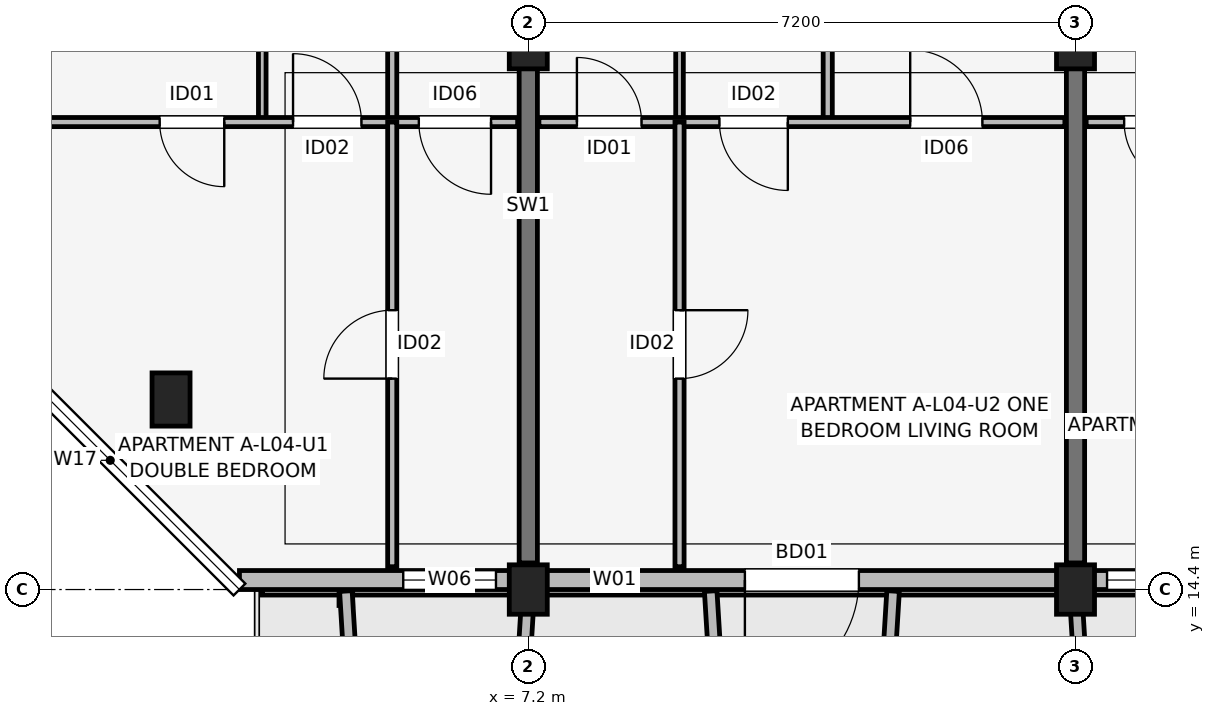
"""IFC4 building model, lengths in metres.
Left out: names, types, materials, properties, quantities, classifications, styles, units other than length and angle.
Written with IfcOpenShell. Run it as: python <this file> out.ifc"""

import sys

from ifc_helpers import new_model, si_unit, direction, frame, frame_2d, origin, origin_2d, place, context, subcontext, project, spatial, rectangle, extrude, element, fill, save


model = new_model("IFC4")
c1 = context("Model", 3, precision=1e-05, world=origin(), true_north=direction((0.0, 1.0)))
c2 = subcontext(c1, "Body", "Model", "MODEL_VIEW")
j1 = project(units=[si_unit("LENGTHUNIT", "METRE"), si_unit("PLANEANGLEUNIT", "RADIAN")], contexts=[c1])
p1 = place(None, origin())
s1 = spatial("IfcSite", under=j1, at=p1, CompositionType="ELEMENT")
p2 = place(p1, origin())
s2 = spatial("IfcBuilding", under=s1, at=p2, CompositionType="ELEMENT")
p3 = place(p2, frame((0.0, 0.0, 15.0)))
s3 = spatial("IfcBuildingStorey", under=s2, at=p3, CompositionType="ELEMENT", Elevation=15.0)
p4 = place(p3, frame((2.5, 16.9, 0.0), z_axis=(0.0, 0.0, 1.0), x_axis=(1.0, 0.0, 0.0)))
e1 = element("IfcColumn", 1, at=p4, inside=s3, PredefinedType="COLUMN", context=c2, shape_type="SweptSolid", body=[
    extrude(rectangle(XDim=0.5, YDim=0.7, at=origin_2d()), origin(), (0.0, 0.0, 1.0), 3.15),
])
p5 = place(p3, frame((7.2, 14.4, 0.0), z_axis=(0.0, 0.0, 1.0), x_axis=(1.0, 0.0, 0.0)))
e2 = element("IfcColumn", 2, at=p5, inside=s3, PredefinedType="COLUMN", context=c2, shape_type="SweptSolid", body=[
    extrude(rectangle(XDim=0.5, YDim=0.65, at=origin_2d()), origin(), (0.0, 0.0, 1.0), 3.15),
])
p6 = place(p3, frame((7.2, 21.6, 0.0), z_axis=(0.0, 0.0, 1.0), x_axis=(1.0, 0.0, 0.0)))
e3 = element("IfcColumn", 3, at=p6, inside=s3, PredefinedType="COLUMN", context=c2, shape_type="SweptSolid", body=[
    extrude(rectangle(XDim=0.5, YDim=0.7, at=origin_2d()), origin(), (0.0, 0.0, 1.0), 3.15),
])
p7 = place(p3, frame((14.4, 14.4, 0.0), z_axis=(0.0, 0.0, 1.0), x_axis=(1.0, 0.0, 0.0)))
e4 = element("IfcColumn", 4, at=p7, inside=s3, PredefinedType="COLUMN", context=c2, shape_type="SweptSolid", body=[
    extrude(rectangle(XDim=0.5, YDim=0.65, at=origin_2d()), origin(), (0.0, 0.0, 1.0), 3.15),
])
p8 = place(p3, frame((14.4, 21.6, 0.0), z_axis=(0.0, 0.0, 1.0), x_axis=(1.0, 0.0, 0.0)))
e5 = element("IfcColumn", 5, at=p8, inside=s3, PredefinedType="COLUMN", context=c2, shape_type="SweptSolid", body=[
    extrude(rectangle(XDim=0.5, YDim=0.7, at=origin_2d()), origin(), (0.0, 0.0, 1.0), 3.15),
])
for number, where, z_axis, x_axis in (
    (6, (7.2, 14.75, 0.0), (0.0, 0.0, 1.0), (0.0, 1.0, 0.0)),
    (7, (14.4, 14.75, 0.0), (0.0, 0.0, 1.0), (0.0, 1.0, 0.0)),
):
    element("IfcWall", number, at=place(p3, frame(where, z_axis=z_axis, x_axis=x_axis)), inside=s3, PredefinedType="SHEAR", context=c2, shape_type="SweptSolid", body=[
        extrude(rectangle(XDim=9.4, YDim=0.24, at=frame_2d((4.7, 0.0))), origin(), (0.0, 0.0, 1.0), 3.15),
    ])
p9 = place(p3, frame((3.4, 14.525, 0.0), z_axis=(0.0, 0.0, 1.0), x_axis=(1.0, 0.0, 0.0)))
e8 = element("IfcWall", 8, at=p9, inside=s3, PredefinedType="SOLIDWALL", context=c2, shape_type="SweptSolid", body=[
    extrude(rectangle(XDim=29.2, YDim=0.25, at=frame_2d((14.6, 0.0))), origin(), (0.0, 0.0, 1.0), 2.43),
])
p10 = place(p9, frame((8.15, 0.0, 0.0), z_axis=(0.0, 0.0, 1.0), x_axis=(-1.0, 0.0, 0.0)))
e9 = element("IfcOpeningElement", 9, at=p10, cuts=e8, PredefinedType="OPENING", context=c2, shape_type="SweptSolid", body=[
    extrude(rectangle(XDim=1.5, YDim=2.15, at=frame_2d((0.75, 1.075))), frame((0.0, 0.135, 0.0), z_axis=(0.0, -1.0, 0.0), x_axis=(1.0, 0.0, 0.0)), (0.0, 0.0, 1.0), 0.27),
])
p11 = place(p9, frame((22.7, 0.0, 0.0), z_axis=(0.0, 0.0, 1.0), x_axis=(-1.0, 0.0, 0.0)))
e10 = element("IfcOpeningElement", 10, at=p11, cuts=e8, PredefinedType="OPENING", context=c2, shape_type="SweptSolid", body=[
    extrude(rectangle(XDim=1.8, YDim=2.15, at=frame_2d((0.9, 1.075))), frame((0.0, 0.135, 0.0), z_axis=(0.0, -1.0, 0.0), x_axis=(1.0, 0.0, 0.0)), (0.0, 0.0, 1.0), 0.27),
])
p12 = place(p9, frame((2.155, 0.0, 0.75)))
e11 = element("IfcOpeningElement", 11, at=p12, cuts=e8, PredefinedType="OPENING", context=c2, shape_type="SweptSolid", body=[
    extrude(rectangle(XDim=1.22, YDim=1.5, at=frame_2d((0.61, 0.75))), frame((0.0, 0.135, 0.0), z_axis=(0.0, -1.0, 0.0), x_axis=(1.0, 0.0, 0.0)), (0.0, 0.0, 1.0), 0.27),
])
p13 = place(p9, frame((4.635, 0.0, 0.75)))
e12 = element("IfcOpeningElement", 12, at=p13, cuts=e8, PredefinedType="OPENING", context=c2, shape_type="SweptSolid", body=[
    extrude(rectangle(XDim=0.6, YDim=1.25, at=frame_2d((0.3, 0.625))), frame((0.0, 0.135, 0.0), z_axis=(0.0, -1.0, 0.0), x_axis=(1.0, 0.0, 0.0)), (0.0, 0.0, 1.0), 0.27),
])
p14 = place(p9, frame((11.415, 0.0, 0.7)))
e13 = element("IfcOpeningElement", 13, at=p14, cuts=e8, PredefinedType="OPENING", context=c2, shape_type="SweptSolid", body=[
    extrude(rectangle(XDim=1.86, YDim=1.6, at=frame_2d((0.93, 0.8))), frame((0.0, 0.135, 0.0), z_axis=(0.0, -1.0, 0.0), x_axis=(1.0, 0.0, 0.0)), (0.0, 0.0, 1.0), 0.27),
])
p15 = place(p9, frame((16.43, 0.0, 0.75)))
e14 = element("IfcOpeningElement", 14, at=p15, cuts=e8, PredefinedType="OPENING", context=c2, shape_type="SweptSolid", body=[
    extrude(rectangle(XDim=0.85, YDim=1.4, at=frame_2d((0.425, 0.7))), frame((0.0, 0.135, 0.0), z_axis=(0.0, -1.0, 0.0), x_axis=(1.0, 0.0, 0.0)), (0.0, 0.0, 1.0), 0.27),
])
p16 = place(p9, frame((18.845, 0.0, 0.75)))
e15 = element("IfcOpeningElement", 15, at=p16, cuts=e8, PredefinedType="OPENING", context=c2, shape_type="SweptSolid", body=[
    extrude(rectangle(XDim=0.98, YDim=1.45, at=frame_2d((0.49, 0.725))), frame((0.0, 0.135, 0.0), z_axis=(0.0, -1.0, 0.0), x_axis=(1.0, 0.0, 0.0)), (0.0, 0.0, 1.0), 0.27),
])
p17 = place(p9, frame((25.985, 0.0, 0.75)))
e16 = element("IfcOpeningElement", 16, at=p17, cuts=e8, PredefinedType="OPENING", context=c2, shape_type="SweptSolid", body=[
    extrude(rectangle(XDim=1.1, YDim=1.5, at=frame_2d((0.55, 0.75))), frame((0.0, 0.135, 0.0), z_axis=(0.0, -1.0, 0.0), x_axis=(1.0, 0.0, 0.0)), (0.0, 0.0, 1.0), 0.27),
])
for number, where, z_axis, x_axis in (
    (17, (4.8, 14.38, 0.0), (0.0, 0.0, 1.0), (0.061, -0.998, 0.0)),
    (18, (7.2, 14.38, 0.0), (0.0, 0.0, 1.0), (-0.061, -0.998, 0.0)),
):
    element("IfcWall", number, at=place(p3, frame(where, z_axis=z_axis, x_axis=x_axis)), inside=s3, PredefinedType="ELEMENTEDWALL", context=c2, shape_type="SweptSolid", body=[
        extrude(rectangle(XDim=1.964, YDim=0.165, at=frame_2d((0.982, 0.0))), origin(), (0.0, 0.0, 1.0), 2.95),
    ])
for number, where, z_axis, x_axis in (
    (19, (9.6, 14.38, 0.0), (0.0, 0.0, 1.0), (0.061, -0.998, 0.0)),
    (20, (12.0, 14.38, 0.0), (0.0, 0.0, 1.0), (-0.061, -0.998, 0.0)),
):
    element("IfcWall", number, at=place(p3, frame(where, z_axis=z_axis, x_axis=x_axis)), inside=s3, PredefinedType="ELEMENTEDWALL", context=c2, shape_type="SweptSolid", body=[
        extrude(rectangle(XDim=1.964, YDim=0.165, at=frame_2d((0.982, 0.0))), origin(), (0.0, 0.0, 1.0), 2.45),
    ])
p18 = place(p3, frame((14.4, 14.38, 0.0), z_axis=(0.0, 0.0, 1.0), x_axis=(0.061170732449, -0.998127317276, 0.0)))
e21 = element("IfcWall", 21, at=p18, inside=s3, PredefinedType="ELEMENTEDWALL", context=c2, shape_type="SweptSolid", body=[
    extrude(rectangle(XDim=1.964, YDim=0.165, at=frame_2d((0.982, 0.0))), origin(), (0.0, 0.0, 1.0), 2.95),
])
p19 = place(p3, frame((3.7, 20.55, 0.0), z_axis=(0.0, 0.0, 1.0), x_axis=(0.0, 1.0, 0.0)))
e22 = element("IfcWall", 22, at=p19, inside=s3, PredefinedType="PARTITIONING", context=c2, shape_type="SweptSolid", body=[
    extrude(rectangle(XDim=3.75, YDim=0.1, at=frame_2d((1.875, 0.0))), origin(), (0.0, 0.0, 1.0), 2.375),
])
p20 = place(p3, frame((5.41, 20.55, 0.0), z_axis=(0.0, 0.0, 1.0), x_axis=(0.0, 1.0, 0.0)))
e23 = element("IfcWall", 23, at=p20, inside=s3, PredefinedType="PARTITIONING", context=c2, shape_type="SweptSolid", body=[
    extrude(rectangle(XDim=3.75, YDim=0.12, at=frame_2d((1.875, 0.0))), origin(), (0.0, 0.0, 1.0), 2.375),
])
p21 = place(p3, frame((0.14, 20.55, 0.0), z_axis=(0.0, 0.0, 1.0), x_axis=(1.0, 0.0, 0.0)))
e24 = element("IfcWall", 24, at=p21, inside=s3, PredefinedType="PARTITIONING", context=c2, shape_type="SweptSolid", body=[
    extrude(rectangle(XDim=6.92, YDim=0.12, at=frame_2d((3.46, 0.0))), origin(), (0.0, 0.0, 1.0), 2.38),
])
p22 = place(p21, frame((3.06, 0.0, 0.0), z_axis=(0.0, 0.0, 1.0), x_axis=(-1.0, 0.0, 0.0)))
e25 = element("IfcOpeningElement", 25, at=p22, cuts=e24, PredefinedType="OPENING", context=c2, shape_type="SweptSolid", body=[
    extrude(rectangle(XDim=0.85, YDim=2.08, at=frame_2d((0.425, 1.04))), frame((0.0, 0.07, 0.0), z_axis=(0.0, -1.0, 0.0), x_axis=(1.0, 0.0, 0.0)), (0.0, 0.0, 1.0), 0.14),
])
p23 = place(p21, frame((3.965, 0.0, 0.0)))
e26 = element("IfcOpeningElement", 26, at=p23, cuts=e24, PredefinedType="OPENING", context=c2, shape_type="SweptSolid", body=[
    extrude(rectangle(XDim=0.9, YDim=2.08, at=frame_2d((0.45, 1.04))), frame((0.0, 0.07, 0.0), z_axis=(0.0, -1.0, 0.0), x_axis=(1.0, 0.0, 0.0)), (0.0, 0.0, 1.0), 0.14),
])
p24 = place(p21, frame((6.57, 0.0, 0.0), z_axis=(0.0, 0.0, 1.0), x_axis=(-1.0, 0.0, 0.0)))
e27 = element("IfcOpeningElement", 27, at=p24, cuts=e24, PredefinedType="OPENING", context=c2, shape_type="SweptSolid", body=[
    extrude(rectangle(XDim=0.95, YDim=2.08, at=frame_2d((0.475, 1.04))), frame((0.0, 0.07, 0.0), z_axis=(0.0, -1.0, 0.0), x_axis=(1.0, 0.0, 0.0)), (0.0, 0.0, 1.0), 0.14),
])
p25 = place(p3, frame((5.41, 14.7, 0.0), z_axis=(0.0, 0.0, 1.0), x_axis=(0.0, 1.0, 0.0)))
e28 = element("IfcWall", 28, at=p25, inside=s3, PredefinedType="PARTITIONING", context=c2, shape_type="SweptSolid", body=[
    extrude(rectangle(XDim=5.85, YDim=0.12, at=frame_2d((2.925, 0.0))), origin(), (0.0, 0.0, 1.0), 2.38),
])
p26 = place(p25, frame((2.475, 0.0, 0.0)))
e29 = element("IfcOpeningElement", 29, at=p26, cuts=e28, PredefinedType="OPENING", context=c2, shape_type="SweptSolid", body=[
    extrude(rectangle(XDim=0.9, YDim=2.08, at=frame_2d((0.45, 1.04))), frame((0.0, 0.07, 0.0), z_axis=(0.0, -1.0, 0.0), x_axis=(1.0, 0.0, 0.0)), (0.0, 0.0, 1.0), 0.14),
])
p27 = place(p3, frame((9.19, 20.55, 0.0), z_axis=(0.0, 0.0, 1.0), x_axis=(0.0, 1.0, 0.0)))
e30 = element("IfcWall", 30, at=p27, inside=s3, PredefinedType="PARTITIONING", context=c2, shape_type="SweptSolid", body=[
    extrude(rectangle(XDim=3.75, YDim=0.1, at=frame_2d((1.875, 0.0))), origin(), (0.0, 0.0, 1.0), 2.375),
])
p28 = place(p3, frame((11.14, 20.55, 0.0), z_axis=(0.0, 0.0, 1.0), x_axis=(0.0, 1.0, 0.0)))
e31 = element("IfcWall", 31, at=p28, inside=s3, PredefinedType="PARTITIONING", context=c2, shape_type="SweptSolid", body=[
    extrude(rectangle(XDim=3.75, YDim=0.12, at=frame_2d((1.875, 0.0))), origin(), (0.0, 0.0, 1.0), 2.375),
])
p29 = place(p3, frame((7.34, 20.55, 0.0), z_axis=(0.0, 0.0, 1.0), x_axis=(1.0, 0.0, 0.0)))
e32 = element("IfcWall", 32, at=p29, inside=s3, PredefinedType="PARTITIONING", context=c2, shape_type="SweptSolid", body=[
    extrude(rectangle(XDim=6.92, YDim=0.12, at=frame_2d((3.46, 0.0))), origin(), (0.0, 0.0, 1.0), 2.38),
])
p30 = place(p29, frame((0.5, 0.0, 0.0)))
e33 = element("IfcOpeningElement", 33, at=p30, cuts=e32, PredefinedType="OPENING", context=c2, shape_type="SweptSolid", body=[
    extrude(rectangle(XDim=0.85, YDim=2.08, at=frame_2d((0.425, 1.04))), frame((0.0, 0.07, 0.0), z_axis=(0.0, -1.0, 0.0), x_axis=(1.0, 0.0, 0.0)), (0.0, 0.0, 1.0), 0.14),
])
p31 = place(p29, frame((3.275, 0.0, 0.0), z_axis=(0.0, 0.0, 1.0), x_axis=(-1.0, 0.0, 0.0)))
e34 = element("IfcOpeningElement", 34, at=p31, cuts=e32, PredefinedType="OPENING", context=c2, shape_type="SweptSolid", body=[
    extrude(rectangle(XDim=0.9, YDim=2.08, at=frame_2d((0.45, 1.04))), frame((0.0, 0.07, 0.0), z_axis=(0.0, -1.0, 0.0), x_axis=(1.0, 0.0, 0.0)), (0.0, 0.0, 1.0), 0.14),
])
p32 = place(p29, frame((4.885, 0.0, 0.0)))
e35 = element("IfcOpeningElement", 35, at=p32, cuts=e32, PredefinedType="OPENING", context=c2, shape_type="SweptSolid", body=[
    extrude(rectangle(XDim=0.95, YDim=2.08, at=frame_2d((0.475, 1.04))), frame((0.0, 0.07, 0.0), z_axis=(0.0, -1.0, 0.0), x_axis=(1.0, 0.0, 0.0)), (0.0, 0.0, 1.0), 0.14),
])
p33 = place(p3, frame((9.19, 14.7, 0.0), z_axis=(0.0, 0.0, 1.0), x_axis=(0.0, 1.0, 0.0)))
e36 = element("IfcWall", 36, at=p33, inside=s3, PredefinedType="PARTITIONING", context=c2, shape_type="SweptSolid", body=[
    extrude(rectangle(XDim=5.85, YDim=0.12, at=frame_2d((2.925, 0.0))), origin(), (0.0, 0.0, 1.0), 2.38),
])
p34 = place(p33, frame((3.375, 0.0, 0.0), z_axis=(0.0, 0.0, 1.0), x_axis=(-1.0, 0.0, 0.0)))
e37 = element("IfcOpeningElement", 37, at=p34, cuts=e36, PredefinedType="OPENING", context=c2, shape_type="SweptSolid", body=[
    extrude(rectangle(XDim=0.9, YDim=2.08, at=frame_2d((0.45, 1.04))), frame((0.0, 0.07, 0.0), z_axis=(0.0, -1.0, 0.0), x_axis=(1.0, 0.0, 0.0)), (0.0, 0.0, 1.0), 0.14),
])
p35 = place(p3, frame((14.54, 20.55, 0.0), z_axis=(0.0, 0.0, 1.0), x_axis=(1.0, 0.0, 0.0)))
e38 = element("IfcWall", 38, at=p35, inside=s3, PredefinedType="PARTITIONING", context=c2, shape_type="SweptSolid", body=[
    extrude(rectangle(XDim=6.92, YDim=0.12, at=frame_2d((3.46, 0.0))), origin(), (0.0, 0.0, 1.0), 2.38),
])
p36 = place(p35, frame((1.35, 0.0, 0.0), z_axis=(0.0, 0.0, 1.0), x_axis=(-1.0, 0.0, 0.0)))
e39 = element("IfcOpeningElement", 39, at=p36, cuts=e38, PredefinedType="OPENING", context=c2, shape_type="SweptSolid", body=[
    extrude(rectangle(XDim=0.85, YDim=2.08, at=frame_2d((0.425, 1.04))), frame((0.0, 0.07, 0.0), z_axis=(0.0, -1.0, 0.0), x_axis=(1.0, 0.0, 0.0)), (0.0, 0.0, 1.0), 0.14),
])
p37 = place(p35, frame((2.525, 0.0, 0.0)))
e40 = element("IfcOpeningElement", 40, at=p37, cuts=e38, PredefinedType="OPENING", context=c2, shape_type="SweptSolid", body=[
    extrude(rectangle(XDim=0.9, YDim=2.08, at=frame_2d((0.45, 1.04))), frame((0.0, 0.07, 0.0), z_axis=(0.0, -1.0, 0.0), x_axis=(1.0, 0.0, 0.0)), (0.0, 0.0, 1.0), 0.14),
])
p38 = place(p35, frame((5.985, 0.0, 0.0), z_axis=(0.0, 0.0, 1.0), x_axis=(-1.0, 0.0, 0.0)))
e41 = element("IfcOpeningElement", 41, at=p38, cuts=e38, PredefinedType="OPENING", context=c2, shape_type="SweptSolid", body=[
    extrude(rectangle(XDim=0.95, YDim=2.08, at=frame_2d((0.475, 1.04))), frame((0.0, 0.07, 0.0), z_axis=(0.0, -1.0, 0.0), x_axis=(1.0, 0.0, 0.0)), (0.0, 0.0, 1.0), 0.14),
])
p39 = place(p10, origin())
e42 = element("IfcDoor", 42, at=p39, inside=s3, OperationType="SINGLE_SWING_LEFT", PredefinedType="DOOR", context=c2, shape_type="SweptSolid", body=[
    extrude(rectangle(XDim=1.5, YDim=2.15, at=frame_2d((0.75, 1.075))), frame((0.0, 0.025, 0.0), z_axis=(0.0, -1.0, 0.0), x_axis=(1.0, 0.0, 0.0)), (0.0, 0.0, 1.0), 0.05),
])
fill(e9, e42)
p40 = place(p12, origin())
e43 = element("IfcWindow", 43, at=p40, inside=s3, PartitioningType="SINGLE_PANEL", PredefinedType="WINDOW", context=c2, shape_type="SweptSolid", body=[
    extrude(rectangle(XDim=1.22, YDim=1.5, at=frame_2d((0.61, 0.75))), frame((0.0, 0.03, 0.0), z_axis=(0.0, -1.0, 0.0), x_axis=(1.0, 0.0, 0.0)), (0.0, 0.0, 1.0), 0.06),
])
fill(e11, e43)
p41 = place(p13, origin())
e44 = element("IfcWindow", 44, at=p41, inside=s3, PartitioningType="SINGLE_PANEL", PredefinedType="WINDOW", context=c2, shape_type="SweptSolid", body=[
    extrude(rectangle(XDim=0.6, YDim=1.25, at=frame_2d((0.3, 0.625))), frame((0.0, 0.03, 0.0), z_axis=(0.0, -1.0, 0.0), x_axis=(1.0, 0.0, 0.0)), (0.0, 0.0, 1.0), 0.06),
])
fill(e12, e44)
p42 = place(p14, origin())
e45 = element("IfcWindow", 45, at=p42, inside=s3, PartitioningType="SINGLE_PANEL", PredefinedType="WINDOW", context=c2, shape_type="SweptSolid", body=[
    extrude(rectangle(XDim=1.86, YDim=1.6, at=frame_2d((0.93, 0.8))), frame((0.0, 0.03, 0.0), z_axis=(0.0, -1.0, 0.0), x_axis=(1.0, 0.0, 0.0)), (0.0, 0.0, 1.0), 0.06),
])
fill(e13, e45)
p43 = place(p22, origin())
e46 = element("IfcDoor", 46, at=p43, inside=s3, OperationType="SINGLE_SWING_RIGHT", PredefinedType="DOOR", context=c2, shape_type="SweptSolid", body=[
    extrude(rectangle(XDim=0.85, YDim=2.08, at=frame_2d((0.425, 1.04))), frame((0.0, 0.025, 0.0), z_axis=(0.0, -1.0, 0.0), x_axis=(1.0, 0.0, 0.0)), (0.0, 0.0, 1.0), 0.05),
])
fill(e25, e46)
p44 = place(p23, origin())
e47 = element("IfcDoor", 47, at=p44, inside=s3, OperationType="SINGLE_SWING_LEFT", PredefinedType="DOOR", context=c2, shape_type="SweptSolid", body=[
    extrude(rectangle(XDim=0.9, YDim=2.08, at=frame_2d((0.45, 1.04))), frame((0.0, 0.025, 0.0), z_axis=(0.0, -1.0, 0.0), x_axis=(1.0, 0.0, 0.0)), (0.0, 0.0, 1.0), 0.05),
])
fill(e26, e47)
p45 = place(p24, origin())
e48 = element("IfcDoor", 48, at=p45, inside=s3, OperationType="SINGLE_SWING_RIGHT", PredefinedType="DOOR", context=c2, shape_type="SweptSolid", body=[
    extrude(rectangle(XDim=0.95, YDim=2.08, at=frame_2d((0.475, 1.04))), frame((0.0, 0.025, 0.0), z_axis=(0.0, -1.0, 0.0), x_axis=(1.0, 0.0, 0.0)), (0.0, 0.0, 1.0), 0.05),
])
fill(e27, e48)
p46 = place(p26, origin())
e49 = element("IfcDoor", 49, at=p46, inside=s3, OperationType="SINGLE_SWING_LEFT", PredefinedType="DOOR", context=c2, shape_type="SweptSolid", body=[
    extrude(rectangle(XDim=0.9, YDim=2.08, at=frame_2d((0.45, 1.04))), frame((0.0, 0.025, 0.0), z_axis=(0.0, -1.0, 0.0), x_axis=(1.0, 0.0, 0.0)), (0.0, 0.0, 1.0), 0.05),
])
fill(e29, e49)
p47 = place(p30, origin())
e50 = element("IfcDoor", 50, at=p47, inside=s3, OperationType="SINGLE_SWING_LEFT", PredefinedType="DOOR", context=c2, shape_type="SweptSolid", body=[
    extrude(rectangle(XDim=0.85, YDim=2.08, at=frame_2d((0.425, 1.04))), frame((0.0, 0.025, 0.0), z_axis=(0.0, -1.0, 0.0), x_axis=(1.0, 0.0, 0.0)), (0.0, 0.0, 1.0), 0.05),
])
fill(e33, e50)
p48 = place(p31, origin())
e51 = element("IfcDoor", 51, at=p48, inside=s3, OperationType="SINGLE_SWING_RIGHT", PredefinedType="DOOR", context=c2, shape_type="SweptSolid", body=[
    extrude(rectangle(XDim=0.9, YDim=2.08, at=frame_2d((0.45, 1.04))), frame((0.0, 0.025, 0.0), z_axis=(0.0, -1.0, 0.0), x_axis=(1.0, 0.0, 0.0)), (0.0, 0.0, 1.0), 0.05),
])
fill(e34, e51)
p49 = place(p32, origin())
e52 = element("IfcDoor", 52, at=p49, inside=s3, OperationType="SINGLE_SWING_LEFT", PredefinedType="DOOR", context=c2, shape_type="SweptSolid", body=[
    extrude(rectangle(XDim=0.95, YDim=2.08, at=frame_2d((0.475, 1.04))), frame((0.0, 0.025, 0.0), z_axis=(0.0, -1.0, 0.0), x_axis=(1.0, 0.0, 0.0)), (0.0, 0.0, 1.0), 0.05),
])
fill(e35, e52)
p50 = place(p34, origin())
e53 = element("IfcDoor", 53, at=p50, inside=s3, OperationType="SINGLE_SWING_RIGHT", PredefinedType="DOOR", context=c2, shape_type="SweptSolid", body=[
    extrude(rectangle(XDim=0.9, YDim=2.08, at=frame_2d((0.45, 1.04))), frame((0.0, 0.025, 0.0), z_axis=(0.0, -1.0, 0.0), x_axis=(1.0, 0.0, 0.0)), (0.0, 0.0, 1.0), 0.05),
])
fill(e37, e53)
p51 = place(p36, origin())
e54 = element("IfcDoor", 54, at=p51, inside=s3, OperationType="SINGLE_SWING_RIGHT", PredefinedType="DOOR", context=c2, shape_type="SweptSolid", body=[
    extrude(rectangle(XDim=0.85, YDim=2.08, at=frame_2d((0.425, 1.04))), frame((0.0, 0.025, 0.0), z_axis=(0.0, -1.0, 0.0), x_axis=(1.0, 0.0, 0.0)), (0.0, 0.0, 1.0), 0.05),
])
fill(e39, e54)
save(model, sys.argv[1])
